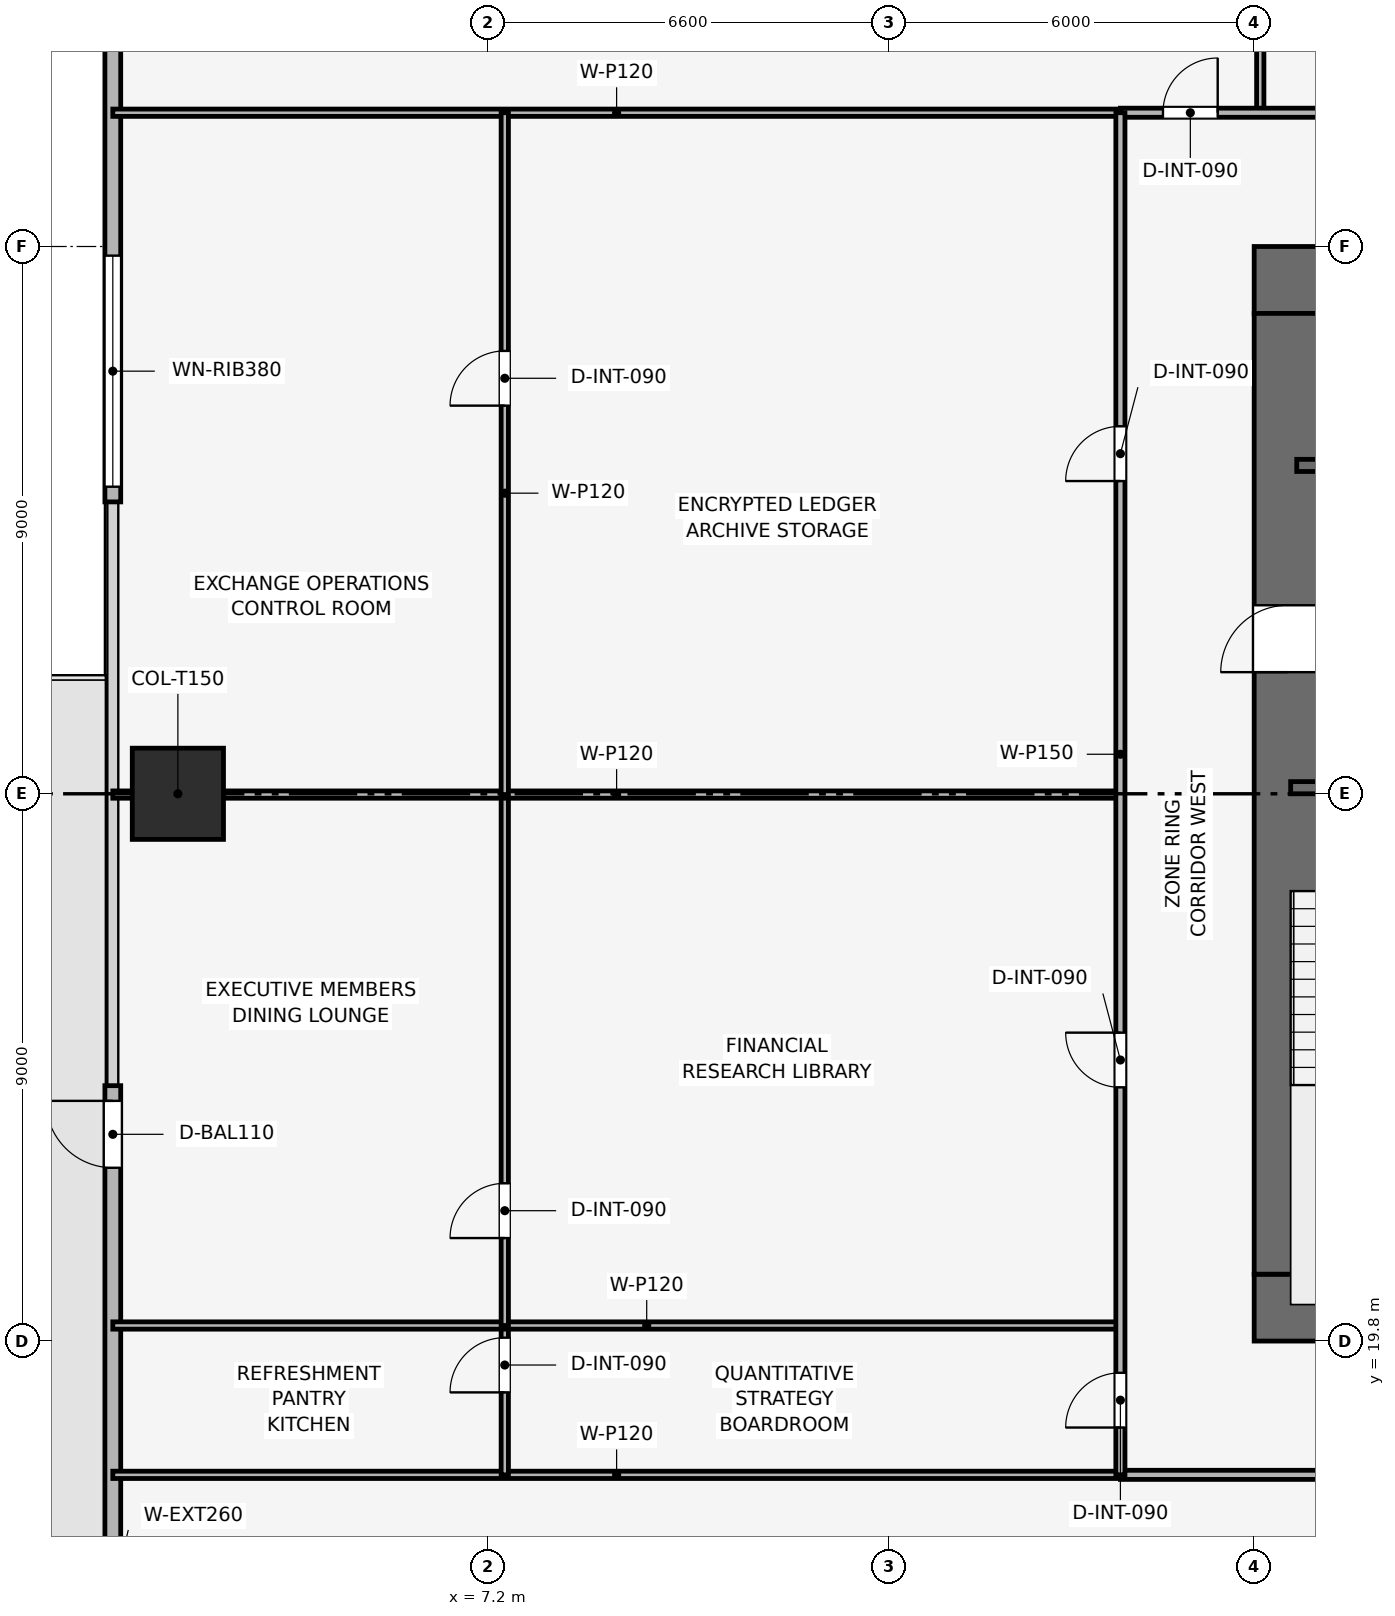
"""IFC4 building model, lengths in metres.
Left out: names, types, materials, properties, quantities, classifications, styles, units other than length and angle.
Written with IfcOpenShell. Run it as: python <this file> out.ifc"""

import sys

from ifc_helpers import new_model, si_unit, direction, frame, frame_2d, origin, origin_2d, place, context, subcontext, project, spatial, rectangle, extrude, element, fill, save


model = new_model("IFC4")
c1 = context("Model", 3, precision=1e-05, world=origin(), true_north=direction((0.0, 1.0)))
c2 = subcontext(c1, "Body", "Model", "MODEL_VIEW")
j1 = project(units=[si_unit("LENGTHUNIT", "METRE"), si_unit("PLANEANGLEUNIT", "RADIAN")], contexts=[c1])
p1 = place(None, origin())
s1 = spatial("IfcSite", under=j1, at=p1, CompositionType="ELEMENT")
p2 = place(p1, origin())
s2 = spatial("IfcBuilding", under=s1, at=p2, CompositionType="ELEMENT")
p3 = place(p2, frame((0.0, 0.0, 72.9)))
s3 = spatial("IfcBuildingStorey", under=s2, at=p3, CompositionType="ELEMENT", Elevation=72.9)
p4 = place(p3, frame((19.8, 20.35, 0.0), z_axis=(0.0, 0.0, 1.0), x_axis=(1.0, 0.0, 0.0)))
e1 = element("IfcWall", 1, at=p4, inside=s3, PredefinedType="SHEAR", context=c2, shape_type="SweptSolid", body=[
    extrude(rectangle(XDim=18.0, YDim=1.1, at=frame_2d((9.0, 0.0))), origin(), (0.0, 0.0, 1.0), 3.9),
])
p5 = place(p4, frame((8.4, 0.0, 0.0)))
e2 = element("IfcOpeningElement", 2, at=p5, cuts=e1, PredefinedType="OPENING", context=c2, shape_type="SweptSolid", body=[
    extrude(rectangle(XDim=1.2, YDim=2.2, at=frame_2d((0.6, 1.1))), frame((0.0, 0.56, 0.0), z_axis=(0.0, -1.0, 0.0), x_axis=(1.0, 0.0, 0.0)), (0.0, 0.0, 1.0), 1.12),
])
p6 = place(p3, frame((19.8, 37.25, 0.0), z_axis=(0.0, 0.0, 1.0), x_axis=(1.0, 0.0, 0.0)))
e3 = element("IfcWall", 3, at=p6, inside=s3, PredefinedType="SHEAR", context=c2, shape_type="SweptSolid", body=[
    extrude(rectangle(XDim=18.0, YDim=1.1, at=frame_2d((9.0, 0.0))), origin(), (0.0, 0.0, 1.0), 3.9),
])
p7 = place(p6, frame((7.05, 0.0, 0.0)))
e4 = element("IfcOpeningElement", 4, at=p7, cuts=e3, PredefinedType="OPENING", context=c2, shape_type="SweptSolid", body=[
    extrude(rectangle(XDim=1.1, YDim=2.15, at=frame_2d((0.55, 1.075))), frame((0.0, 0.56, 0.0), z_axis=(0.0, -1.0, 0.0), x_axis=(1.0, 0.0, 0.0)), (0.0, 0.0, 1.0), 1.12),
])
p8 = place(p3, frame((20.35, 20.9, 0.0), z_axis=(0.0, 0.0, 1.0), x_axis=(0.0, 1.0, 0.0)))
e5 = element("IfcWall", 5, at=p8, inside=s3, PredefinedType="SHEAR", context=c2, shape_type="SweptSolid", body=[
    extrude(rectangle(XDim=15.8, YDim=1.1, at=frame_2d((7.9, 0.0))), origin(), (0.0, 0.0, 1.0), 3.9),
])
p9 = place(p8, frame((9.9, 0.0, 0.0)))
e6 = element("IfcOpeningElement", 6, at=p9, cuts=e5, PredefinedType="OPENING", context=c2, shape_type="SweptSolid", body=[
    extrude(rectangle(XDim=1.1, YDim=2.15, at=frame_2d((0.55, 1.075))), frame((0.0, 0.56, 0.0), z_axis=(0.0, -1.0, 0.0), x_axis=(1.0, 0.0, 0.0)), (0.0, 0.0, 1.0), 1.12),
])
p10 = place(p3, frame((2.1, 28.8, 0.003), z_axis=(0.0, 0.0, 1.0), x_axis=(1.0, 0.0, 0.0)))
e7 = element("IfcColumn", 7, at=p10, inside=s3, PredefinedType="COLUMN", context=c2, shape_type="SweptSolid", body=[
    extrude(rectangle(XDim=1.5, YDim=1.5, at=origin_2d()), origin(), (0.0, 0.0, 1.0), 3.644),
])
p11 = place(p3, frame((1.03, 8.7, 0.0), z_axis=(0.0, 0.0, 1.0), x_axis=(0.0, 1.0, 0.0)))
e8 = element("IfcWall", 8, at=p11, inside=s3, PredefinedType="SOLIDWALL", context=c2, shape_type="SweptSolid", body=[
    extrude(rectangle(XDim=15.3, YDim=0.26, at=frame_2d((7.65, 0.0))), origin(), (0.0, 0.0, 1.0), 3.65),
])
p12 = place(p11, frame((13.95, 0.0, 0.0)))
e9 = element("IfcOpeningElement", 9, at=p12, cuts=e8, PredefinedType="OPENING", context=c2, shape_type="SweptSolid", body=[
    extrude(rectangle(XDim=1.1, YDim=2.2, at=frame_2d((0.55, 1.1))), frame((0.0, 0.14, 0.0), z_axis=(0.0, -1.0, 0.0), x_axis=(1.0, 0.0, 0.0)), (0.0, 0.0, 1.0), 0.28),
])
p13 = place(p3, frame((1.03, 33.6, 0.0), z_axis=(0.0, 0.0, 1.0), x_axis=(0.0, 1.0, 0.0)))
e10 = element("IfcWall", 10, at=p13, inside=s3, PredefinedType="SOLIDWALL", context=c2, shape_type="SweptSolid", body=[
    extrude(rectangle(XDim=15.3, YDim=0.26, at=frame_2d((7.65, 0.0))), origin(), (0.0, 0.0, 1.0), 3.65),
])
p14 = place(p13, frame((0.25, 0.0, 0.9)))
e11 = element("IfcOpeningElement", 11, at=p14, cuts=e10, PredefinedType="OPENING", context=c2, shape_type="SweptSolid", body=[
    extrude(rectangle(XDim=3.8, YDim=1.9, at=frame_2d((1.9, 0.95))), frame((0.0, 0.14, 0.0), z_axis=(0.0, -1.0, 0.0), x_axis=(1.0, 0.0, 0.0)), (0.0, 0.0, 1.0), 0.28),
])
p15 = place(p3, frame((20.4, 28.9, 0.0), z_axis=(0.0, 0.0, 1.0), x_axis=(1.0, 0.0, 0.0)))
e12 = element("IfcWall", 12, at=p15, inside=s3, PredefinedType="SHEAR", context=c2, shape_type="SweptSolid", body=[
    extrude(rectangle(XDim=3.15, YDim=0.2, at=frame_2d((1.575, 0.0))), origin(), (0.0, 0.0, 1.0), 3.65),
])
p16 = place(p15, frame((0.8, 0.0, 0.0)))
e13 = element("IfcOpeningElement", 13, at=p16, cuts=e12, PredefinedType="OPENING", context=c2, shape_type="SweptSolid", body=[
    extrude(rectangle(XDim=1.0, YDim=2.1, at=frame_2d((0.5, 1.05))), frame((0.0, 0.11, 0.0), z_axis=(0.0, -1.0, 0.0), x_axis=(1.0, 0.0, 0.0)), (0.0, 0.0, 1.0), 0.22),
])
p17 = place(p3, frame((20.5, 34.2, 0.0), z_axis=(0.0, 0.0, 1.0), x_axis=(1.0, 0.0, 0.0)))
e14 = element("IfcWall", 14, at=p17, inside=s3, PredefinedType="SHEAR", context=c2, shape_type="SweptSolid", body=[
    extrude(rectangle(XDim=3.05, YDim=0.2, at=frame_2d((1.525, 0.0))), origin(), (0.0, 0.0, 1.0), 3.65),
])
p18 = place(p17, frame((0.75, 0.0, 0.0)))
e15 = element("IfcOpeningElement", 15, at=p18, cuts=e14, PredefinedType="OPENING", context=c2, shape_type="SweptSolid", body=[
    extrude(rectangle(XDim=1.1, YDim=2.15, at=frame_2d((0.55, 1.075))), frame((0.0, 0.11, 0.0), z_axis=(0.0, -1.0, 0.0), x_axis=(1.0, 0.0, 0.0)), (0.0, 0.0, 1.0), 0.22),
])
for number, where, z_axis, x_axis in (
    (16, (19.9, 40.0, 0.0), (0.0, 0.0, 1.0), (0.0, 1.0, 0.0)),
    (17, (1.03, 17.6, 0.0), (0.0, 0.0, 1.0), (1.0, 0.0, 0.0)),
    (18, (1.03, 40.0, 0.0), (0.0, 0.0, 1.0), (1.0, 0.0, 0.0)),
):
    element("IfcWall", number, at=place(p3, frame(where, z_axis=z_axis, x_axis=x_axis)), inside=s3, PredefinedType="PARTITIONING", context=c2, shape_type="SweptSolid", body=[
        extrude(rectangle(XDim=16.57, YDim=0.12, at=frame_2d((8.285, 0.0))), origin(), (0.0, 0.0, 1.0), 2.935),
    ])
p19 = place(p3, frame((7.476, 17.6, 0.0), z_axis=(0.0, 0.0, 1.0), x_axis=(0.0, 1.0, 0.0)))
e19 = element("IfcWall", 19, at=p19, inside=s3, PredefinedType="PARTITIONING", context=c2, shape_type="SweptSolid", body=[
    extrude(rectangle(XDim=2.456, YDim=0.12, at=frame_2d((1.228, 0.0))), origin(), (0.0, 0.0, 1.0), 3.65),
])
p20 = place(p19, frame((1.356, 0.0, 0.0)))
e20 = element("IfcOpeningElement", 20, at=p20, cuts=e19, PredefinedType="OPENING", context=c2, shape_type="SweptSolid", body=[
    extrude(rectangle(XDim=0.9, YDim=2.1, at=frame_2d((0.45, 1.05))), frame((0.0, 0.07, 0.0), z_axis=(0.0, -1.0, 0.0), x_axis=(1.0, 0.0, 0.0)), (0.0, 0.0, 1.0), 0.14),
])
p21 = place(p3, frame((1.03, 20.056, 0.0), z_axis=(0.0, 0.0, 1.0), x_axis=(1.0, 0.0, 0.0)))
e21 = element("IfcWall", 21, at=p21, inside=s3, PredefinedType="PARTITIONING", context=c2, shape_type="SweptSolid", body=[
    extrude(rectangle(XDim=16.57, YDim=0.12, at=frame_2d((8.285, 0.0))), origin(), (0.0, 0.0, 1.0), 2.935),
])
p22 = place(p3, frame((7.476, 20.056, 0.0), z_axis=(0.0, 0.0, 1.0), x_axis=(0.0, 1.0, 0.0)))
e22 = element("IfcWall", 22, at=p22, inside=s3, PredefinedType="PARTITIONING", context=c2, shape_type="SweptSolid", body=[
    extrude(rectangle(XDim=8.731, YDim=0.12, at=frame_2d((4.366, 0.0))), origin(), (0.0, 0.0, 1.0), 3.085),
])
p23 = place(p22, frame((1.438, 0.0, 0.0)))
e23 = element("IfcOpeningElement", 23, at=p23, cuts=e22, PredefinedType="OPENING", context=c2, shape_type="SweptSolid", body=[
    extrude(rectangle(XDim=0.9, YDim=2.1, at=frame_2d((0.45, 1.05))), frame((0.0, 0.07, 0.0), z_axis=(0.0, -1.0, 0.0), x_axis=(1.0, 0.0, 0.0)), (0.0, 0.0, 1.0), 0.14),
])
p24 = place(p3, frame((1.03, 28.787, 0.0), z_axis=(0.0, 0.0, 1.0), x_axis=(1.0, 0.0, 0.0)))
e24 = element("IfcWall", 24, at=p24, inside=s3, PredefinedType="PARTITIONING", context=c2, shape_type="SweptSolid", body=[
    extrude(rectangle(XDim=16.57, YDim=0.12, at=frame_2d((8.285, 0.0))), origin(), (0.0, 0.0, 1.0), 3.085),
])
p25 = place(p3, frame((7.476, 28.787, 0.0), z_axis=(0.0, 0.0, 1.0), x_axis=(0.0, 1.0, 0.0)))
e25 = element("IfcWall", 25, at=p25, inside=s3, PredefinedType="PARTITIONING", context=c2, shape_type="SweptSolid", body=[
    extrude(rectangle(XDim=11.213, YDim=0.12, at=frame_2d((5.606, 0.0))), origin(), (0.0, 0.0, 1.0), 3.085),
])
p26 = place(p25, frame((6.396, 0.0, 0.0)))
e26 = element("IfcOpeningElement", 26, at=p26, cuts=e25, PredefinedType="OPENING", context=c2, shape_type="SweptSolid", body=[
    extrude(rectangle(XDim=0.9, YDim=2.1, at=frame_2d((0.45, 1.05))), frame((0.0, 0.07, 0.0), z_axis=(0.0, -1.0, 0.0), x_axis=(1.0, 0.0, 0.0)), (0.0, 0.0, 1.0), 0.14),
])
p27 = place(p3, frame((17.6, 17.6, 0.0), z_axis=(0.0, 0.0, 1.0), x_axis=(1.0, 0.0, 0.0)))
e27 = element("IfcWall", 27, at=p27, inside=s3, PredefinedType="PARTITIONING", context=c2, shape_type="SweptSolid", body=[
    extrude(rectangle(XDim=22.4, YDim=0.15, at=frame_2d((11.2, 0.0))), origin(), (0.0, 0.0, 1.0), 3.085),
])
p28 = place(p27, frame((10.75, 0.0, 0.0)))
e28 = element("IfcOpeningElement", 28, at=p28, cuts=e27, PredefinedType="OPENING", context=c2, shape_type="SweptSolid", body=[
    extrude(rectangle(XDim=0.9, YDim=2.1, at=frame_2d((0.45, 1.05))), frame((0.0, 0.085, 0.0), z_axis=(0.0, -1.0, 0.0), x_axis=(1.0, 0.0, 0.0)), (0.0, 0.0, 1.0), 0.17),
])
p29 = place(p3, frame((17.6, 40.0, 0.0), z_axis=(0.0, 0.0, 1.0), x_axis=(1.0, 0.0, 0.0)))
e29 = element("IfcWall", 29, at=p29, inside=s3, PredefinedType="PARTITIONING", context=c2, shape_type="SweptSolid", body=[
    extrude(rectangle(XDim=22.4, YDim=0.15, at=frame_2d((11.2, 0.0))), origin(), (0.0, 0.0, 1.0), 3.085),
])
p30 = place(p29, frame((0.7, 0.0, 0.0)))
e30 = element("IfcOpeningElement", 30, at=p30, cuts=e29, PredefinedType="OPENING", context=c2, shape_type="SweptSolid", body=[
    extrude(rectangle(XDim=0.9, YDim=2.1, at=frame_2d((0.45, 1.05))), frame((0.0, 0.085, 0.0), z_axis=(0.0, -1.0, 0.0), x_axis=(1.0, 0.0, 0.0)), (0.0, 0.0, 1.0), 0.17),
])
p31 = place(p29, frame((4.706, 0.0, 0.0)))
e31 = element("IfcOpeningElement", 31, at=p31, cuts=e29, PredefinedType="OPENING", context=c2, shape_type="SweptSolid", body=[
    extrude(rectangle(XDim=0.9, YDim=2.1, at=frame_2d((0.45, 1.05))), frame((0.0, 0.085, 0.0), z_axis=(0.0, -1.0, 0.0), x_axis=(1.0, 0.0, 0.0)), (0.0, 0.0, 1.0), 0.17),
])
p32 = place(p29, frame((10.704, 0.0, 0.0)))
e32 = element("IfcOpeningElement", 32, at=p32, cuts=e29, PredefinedType="OPENING", context=c2, shape_type="SweptSolid", body=[
    extrude(rectangle(XDim=0.9, YDim=2.1, at=frame_2d((0.45, 1.05))), frame((0.0, 0.085, 0.0), z_axis=(0.0, -1.0, 0.0), x_axis=(1.0, 0.0, 0.0)), (0.0, 0.0, 1.0), 0.17),
])
p33 = place(p29, frame((17.898, 0.0, 0.0)))
e33 = element("IfcOpeningElement", 33, at=p33, cuts=e29, PredefinedType="OPENING", context=c2, shape_type="SweptSolid", body=[
    extrude(rectangle(XDim=0.9, YDim=2.1, at=frame_2d((0.45, 1.05))), frame((0.0, 0.085, 0.0), z_axis=(0.0, -1.0, 0.0), x_axis=(1.0, 0.0, 0.0)), (0.0, 0.0, 1.0), 0.17),
])
p34 = place(p3, frame((17.6, 17.6, 0.0), z_axis=(0.0, 0.0, 1.0), x_axis=(0.0, 1.0, 0.0)))
e34 = element("IfcWall", 34, at=p34, inside=s3, PredefinedType="PARTITIONING", context=c2, shape_type="SweptSolid", body=[
    extrude(rectangle(XDim=22.4, YDim=0.15, at=frame_2d((11.2, 0.0))), origin(), (0.0, 0.0, 1.0), 3.085),
])
p35 = place(p34, frame((0.778, 0.0, 0.0)))
e35 = element("IfcOpeningElement", 35, at=p35, cuts=e34, PredefinedType="OPENING", context=c2, shape_type="SweptSolid", body=[
    extrude(rectangle(XDim=0.9, YDim=2.1, at=frame_2d((0.45, 1.05))), frame((0.0, 0.085, 0.0), z_axis=(0.0, -1.0, 0.0), x_axis=(1.0, 0.0, 0.0)), (0.0, 0.0, 1.0), 0.17),
])
p36 = place(p34, frame((6.372, 0.0, 0.0)))
e36 = element("IfcOpeningElement", 36, at=p36, cuts=e34, PredefinedType="OPENING", context=c2, shape_type="SweptSolid", body=[
    extrude(rectangle(XDim=0.9, YDim=2.1, at=frame_2d((0.45, 1.05))), frame((0.0, 0.085, 0.0), z_axis=(0.0, -1.0, 0.0), x_axis=(1.0, 0.0, 0.0)), (0.0, 0.0, 1.0), 0.17),
])
p37 = place(p34, frame((16.343, 0.0, 0.0)))
e37 = element("IfcOpeningElement", 37, at=p37, cuts=e34, PredefinedType="OPENING", context=c2, shape_type="SweptSolid", body=[
    extrude(rectangle(XDim=0.9, YDim=2.1, at=frame_2d((0.45, 1.05))), frame((0.0, 0.085, 0.0), z_axis=(0.0, -1.0, 0.0), x_axis=(1.0, 0.0, 0.0)), (0.0, 0.0, 1.0), 0.17),
])
p38 = place(p12, origin())
e38 = element("IfcDoor", 38, at=p38, inside=s3, OperationType="SINGLE_SWING_RIGHT", PredefinedType="DOOR", context=c2, shape_type="SweptSolid", body=[
    extrude(rectangle(XDim=1.1, YDim=2.2, at=frame_2d((0.55, 1.1))), frame((0.0, 0.025, 0.0), z_axis=(0.0, -1.0, 0.0), x_axis=(1.0, 0.0, 0.0)), (0.0, 0.0, 1.0), 0.05),
])
fill(e9, e38)
p39 = place(p14, origin())
e39 = element("IfcWindow", 39, at=p39, inside=s3, PartitioningType="SINGLE_PANEL", PredefinedType="WINDOW", context=c2, shape_type="SweptSolid", body=[
    extrude(rectangle(XDim=3.8, YDim=1.9, at=frame_2d((1.9, 0.95))), frame((0.0, 0.03, 0.0), z_axis=(0.0, -1.0, 0.0), x_axis=(1.0, 0.0, 0.0)), (0.0, 0.0, 1.0), 0.06),
])
fill(e11, e39)
p40 = place(p20, origin())
e40 = element("IfcDoor", 40, at=p40, inside=s3, OperationType="SINGLE_SWING_LEFT", PredefinedType="DOOR", context=c2, shape_type="SweptSolid", body=[
    extrude(rectangle(XDim=0.9, YDim=2.1, at=frame_2d((0.45, 1.05))), frame((0.0, 0.025, 0.0), z_axis=(0.0, -1.0, 0.0), x_axis=(1.0, 0.0, 0.0)), (0.0, 0.0, 1.0), 0.05),
])
fill(e20, e40)
p41 = place(p23, origin())
e41 = element("IfcDoor", 41, at=p41, inside=s3, OperationType="SINGLE_SWING_LEFT", PredefinedType="DOOR", context=c2, shape_type="SweptSolid", body=[
    extrude(rectangle(XDim=0.9, YDim=2.1, at=frame_2d((0.45, 1.05))), frame((0.0, 0.025, 0.0), z_axis=(0.0, -1.0, 0.0), x_axis=(1.0, 0.0, 0.0)), (0.0, 0.0, 1.0), 0.05),
])
fill(e23, e41)
p42 = place(p26, origin())
e42 = element("IfcDoor", 42, at=p42, inside=s3, OperationType="SINGLE_SWING_LEFT", PredefinedType="DOOR", context=c2, shape_type="SweptSolid", body=[
    extrude(rectangle(XDim=0.9, YDim=2.1, at=frame_2d((0.45, 1.05))), frame((0.0, 0.025, 0.0), z_axis=(0.0, -1.0, 0.0), x_axis=(1.0, 0.0, 0.0)), (0.0, 0.0, 1.0), 0.05),
])
fill(e26, e42)
p43 = place(p30, origin())
e43 = element("IfcDoor", 43, at=p43, inside=s3, OperationType="SINGLE_SWING_RIGHT", PredefinedType="DOOR", context=c2, shape_type="SweptSolid", body=[
    extrude(rectangle(XDim=0.9, YDim=2.1, at=frame_2d((0.45, 1.05))), frame((0.0, 0.025, 0.0), z_axis=(0.0, -1.0, 0.0), x_axis=(1.0, 0.0, 0.0)), (0.0, 0.0, 1.0), 0.05),
])
fill(e30, e43)
p44 = place(p35, origin())
e44 = element("IfcDoor", 44, at=p44, inside=s3, OperationType="SINGLE_SWING_LEFT", PredefinedType="DOOR", context=c2, shape_type="SweptSolid", body=[
    extrude(rectangle(XDim=0.9, YDim=2.1, at=frame_2d((0.45, 1.05))), frame((0.0, 0.025, 0.0), z_axis=(0.0, -1.0, 0.0), x_axis=(1.0, 0.0, 0.0)), (0.0, 0.0, 1.0), 0.05),
])
fill(e35, e44)
p45 = place(p36, origin())
e45 = element("IfcDoor", 45, at=p45, inside=s3, OperationType="SINGLE_SWING_RIGHT", PredefinedType="DOOR", context=c2, shape_type="SweptSolid", body=[
    extrude(rectangle(XDim=0.9, YDim=2.1, at=frame_2d((0.45, 1.05))), frame((0.0, 0.025, 0.0), z_axis=(0.0, -1.0, 0.0), x_axis=(1.0, 0.0, 0.0)), (0.0, 0.0, 1.0), 0.05),
])
fill(e36, e45)
p46 = place(p37, origin())
e46 = element("IfcDoor", 46, at=p46, inside=s3, OperationType="SINGLE_SWING_LEFT", PredefinedType="DOOR", context=c2, shape_type="SweptSolid", body=[
    extrude(rectangle(XDim=0.9, YDim=2.1, at=frame_2d((0.45, 1.05))), frame((0.0, 0.025, 0.0), z_axis=(0.0, -1.0, 0.0), x_axis=(1.0, 0.0, 0.0)), (0.0, 0.0, 1.0), 0.05),
])
fill(e37, e46)
p47 = place(p9, origin())
e47 = element("IfcDoor", 47, at=p47, inside=s3, OperationType="SINGLE_SWING_LEFT", PredefinedType="DOOR", context=c2, shape_type="SweptSolid", body=[
    extrude(rectangle(XDim=1.1, YDim=2.15, at=frame_2d((0.55, 1.075))), frame((0.0, 0.025, 0.0), z_axis=(0.0, -1.0, 0.0), x_axis=(1.0, 0.0, 0.0)), (0.0, 0.0, 1.0), 0.05),
])
fill(e6, e47)
save(model, sys.argv[1])
